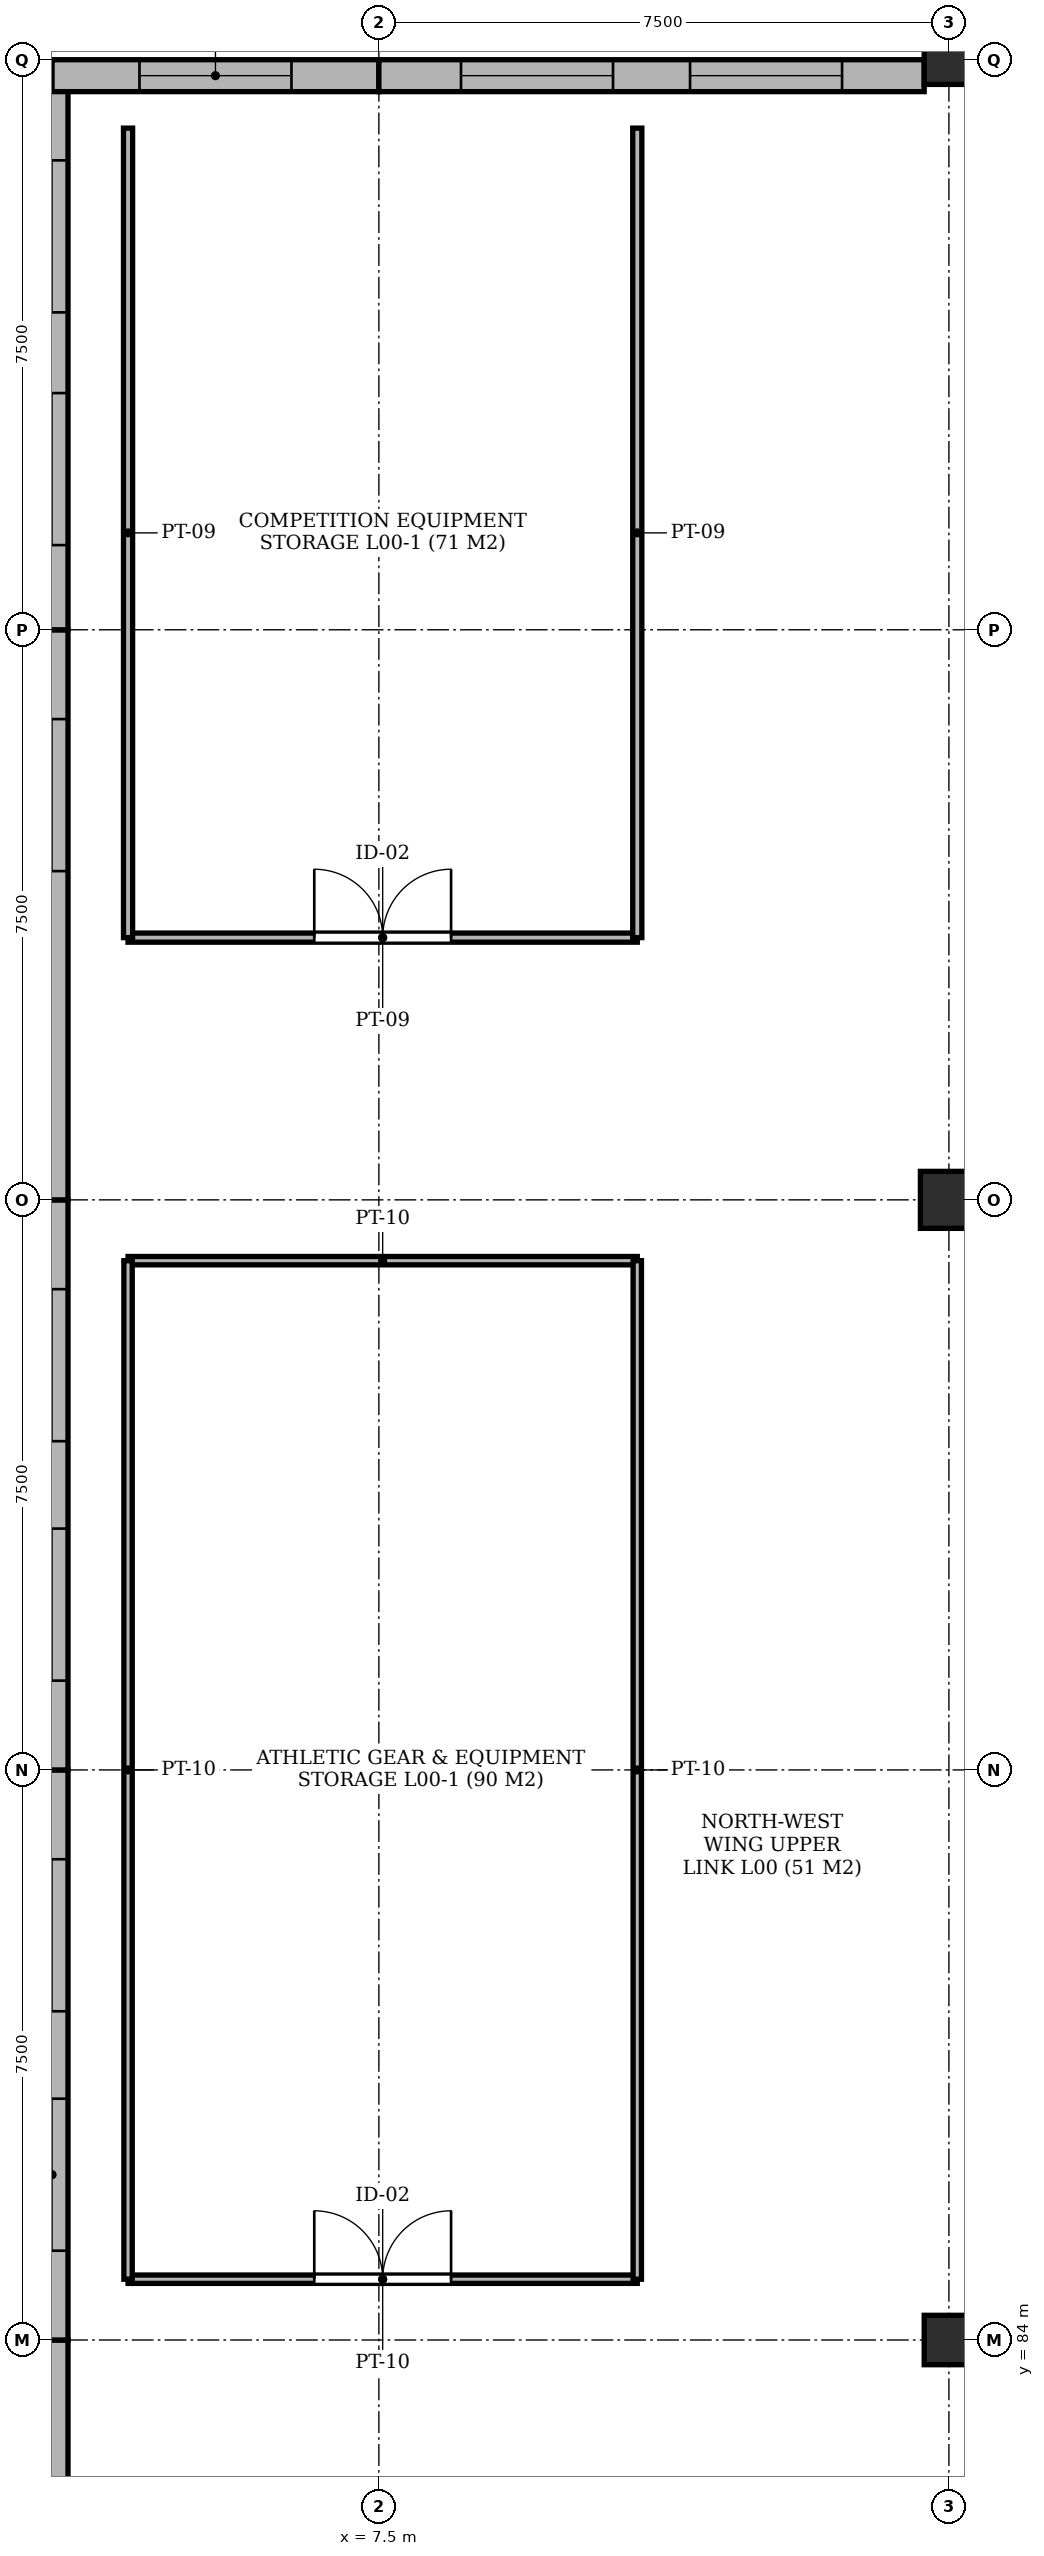
"""IFC4 building model, lengths in metres.
Left out: names, types, materials, properties, quantities, classifications, styles, units other than length and angle.
Written with IfcOpenShell. Run it as: python <this file> out.ifc"""

import sys

from ifc_helpers import new_model, si_unit, direction, frame, frame_2d, origin, origin_2d, place, context, subcontext, project, spatial, rectangle, extrude, element, fill, save


model = new_model("IFC4")
c1 = context("Model", 3, precision=1e-05, world=origin(), true_north=direction((0.0, 1.0)))
c2 = subcontext(c1, "Body", "Model", "MODEL_VIEW")
j1 = project(units=[si_unit("LENGTHUNIT", "METRE"), si_unit("PLANEANGLEUNIT", "RADIAN")], contexts=[c1])
p1 = place(None, origin())
s1 = spatial("IfcSite", under=j1, at=p1, CompositionType="ELEMENT")
p2 = place(p1, origin())
s2 = spatial("IfcBuilding", under=s1, at=p2, CompositionType="ELEMENT")
p3 = place(p2, origin())
s3 = spatial("IfcBuildingStorey", under=s2, at=p3, CompositionType="ELEMENT", Elevation=0.0)
p4 = place(p3, frame((15.0, 84.0, -0.35), z_axis=(0.0, 0.0, 1.0), x_axis=(1.0, 0.0, 0.0)))
e1 = element("IfcColumn", 1, at=p4, inside=s3, PredefinedType="COLUMN", context=c2, shape_type="SweptSolid", body=[
    extrude(rectangle(XDim=0.65, YDim=0.65, at=origin_2d()), origin(), (0.0, 0.0, 1.0), 4.65),
])
p5 = place(p3, frame((15.0, 99.0, -0.35), z_axis=(0.0, 0.0, 1.0), x_axis=(1.0, 0.0, 0.0)))
e2 = element("IfcColumn", 2, at=p5, inside=s3, PredefinedType="COLUMN", context=c2, shape_type="SweptSolid", body=[
    extrude(rectangle(XDim=0.75, YDim=0.75, at=origin_2d()), origin(), (0.0, 0.0, 1.0), 4.65),
])
p6 = place(p3, frame((15.0, 114.0, -0.35), z_axis=(0.0, 0.0, 1.0), x_axis=(1.0, 0.0, 0.0)))
e3 = element("IfcColumn", 3, at=p6, inside=s3, PredefinedType="COLUMN", context=c2, shape_type="SweptSolid", body=[
    extrude(rectangle(XDim=0.65, YDim=0.65, at=origin_2d()), origin(), (0.0, 0.0, 1.0), 4.65),
])
p7 = place(p3, frame((3.2, 84.0, 0.0), z_axis=(0.0, 0.0, 1.0), x_axis=(0.0, -1.0, 0.0)))
e4 = element("IfcWall", 4, at=p7, inside=s3, PredefinedType="SOLIDWALL", context=c2, shape_type="SweptSolid", body=[
    extrude(rectangle(XDim=7.2, YDim=0.42, at=frame_2d((3.6, 0.0))), origin(), (0.0, 0.0, 1.0), 3.82),
])
p8 = place(p7, frame((2.4, 0.0, 0.0)))
e5 = element("IfcOpeningElement", 5, at=p8, cuts=e4, PredefinedType="OPENING", context=c2, shape_type="SweptSolid", body=[
    extrude(rectangle(XDim=2.4, YDim=2.85, at=frame_2d((1.2, 1.425))), frame((0.0, 0.222, 0.0), z_axis=(0.0, -1.0, 0.0), x_axis=(1.0, 0.0, 0.0)), (0.0, 0.0, 1.0), 0.444),
])
p9 = place(p3, frame((3.2, 91.5, 0.0), z_axis=(0.0, 0.0, 1.0), x_axis=(0.0, -1.0, 0.0)))
e6 = element("IfcWall", 6, at=p9, inside=s3, PredefinedType="SOLIDWALL", context=c2, shape_type="SweptSolid", body=[
    extrude(rectangle(XDim=7.5, YDim=0.42, at=frame_2d((3.75, 0.0))), origin(), (0.0, 0.0, 1.0), 3.82),
])
p10 = place(p9, frame((4.325, 0.0, 0.92)))
e7 = element("IfcOpeningElement", 7, at=p10, cuts=e6, PredefinedType="OPENING", context=c2, shape_type="SweptSolid", body=[
    extrude(rectangle(XDim=2.0, YDim=1.89, at=frame_2d((1.0, 0.945))), frame((0.0, 0.222, 0.0), z_axis=(0.0, -1.0, 0.0), x_axis=(1.0, 0.0, 0.0)), (0.0, 0.0, 1.0), 0.444),
])
p11 = place(p9, frame((1.175, 0.0, 0.92)))
e8 = element("IfcOpeningElement", 8, at=p11, cuts=e6, PredefinedType="OPENING", context=c2, shape_type="SweptSolid", body=[
    extrude(rectangle(XDim=2.0, YDim=1.89, at=frame_2d((1.0, 0.945))), frame((0.0, 0.222, 0.0), z_axis=(0.0, -1.0, 0.0), x_axis=(1.0, 0.0, 0.0)), (0.0, 0.0, 1.0), 0.444),
])
p12 = place(p3, frame((3.2, 99.0, 0.0), z_axis=(0.0, 0.0, 1.0), x_axis=(0.0, -1.0, 0.0)))
e9 = element("IfcWall", 9, at=p12, inside=s3, PredefinedType="SOLIDWALL", context=c2, shape_type="SweptSolid", body=[
    extrude(rectangle(XDim=7.5, YDim=0.42, at=frame_2d((3.75, 0.0))), origin(), (0.0, 0.0, 1.0), 3.82),
])
p13 = place(p12, frame((4.325, 0.0, 0.92)))
e10 = element("IfcOpeningElement", 10, at=p13, cuts=e9, PredefinedType="OPENING", context=c2, shape_type="SweptSolid", body=[
    extrude(rectangle(XDim=2.0, YDim=1.89, at=frame_2d((1.0, 0.945))), frame((0.0, 0.222, 0.0), z_axis=(0.0, -1.0, 0.0), x_axis=(1.0, 0.0, 0.0)), (0.0, 0.0, 1.0), 0.444),
])
p14 = place(p12, frame((1.175, 0.0, 0.92)))
e11 = element("IfcOpeningElement", 11, at=p14, cuts=e9, PredefinedType="OPENING", context=c2, shape_type="SweptSolid", body=[
    extrude(rectangle(XDim=2.0, YDim=1.89, at=frame_2d((1.0, 0.945))), frame((0.0, 0.222, 0.0), z_axis=(0.0, -1.0, 0.0), x_axis=(1.0, 0.0, 0.0)), (0.0, 0.0, 1.0), 0.444),
])
p15 = place(p3, frame((3.2, 106.5, 0.0), z_axis=(0.0, 0.0, 1.0), x_axis=(0.0, -1.0, 0.0)))
e12 = element("IfcWall", 12, at=p15, inside=s3, PredefinedType="SOLIDWALL", context=c2, shape_type="SweptSolid", body=[
    extrude(rectangle(XDim=7.5, YDim=0.42, at=frame_2d((3.75, 0.0))), origin(), (0.0, 0.0, 1.0), 3.82),
])
p16 = place(p15, frame((1.175, 0.0, 0.92)))
e13 = element("IfcOpeningElement", 13, at=p16, cuts=e12, PredefinedType="OPENING", context=c2, shape_type="SweptSolid", body=[
    extrude(rectangle(XDim=2.0, YDim=1.89, at=frame_2d((1.0, 0.945))), frame((0.0, 0.222, 0.0), z_axis=(0.0, -1.0, 0.0), x_axis=(1.0, 0.0, 0.0)), (0.0, 0.0, 1.0), 0.444),
])
p17 = place(p3, frame((3.2, 113.79, 0.0), z_axis=(0.0, 0.0, 1.0), x_axis=(0.0, -1.0, 0.0)))
e14 = element("IfcWall", 14, at=p17, inside=s3, PredefinedType="SOLIDWALL", context=c2, shape_type="SweptSolid", body=[
    extrude(rectangle(XDim=7.29, YDim=0.42, at=frame_2d((3.645, 0.0))), origin(), (0.0, 0.0, 1.0), 3.82),
])
p18 = place(p17, frame((4.176, 0.0, 0.92)))
e15 = element("IfcOpeningElement", 15, at=p18, cuts=e14, PredefinedType="OPENING", context=c2, shape_type="SweptSolid", body=[
    extrude(rectangle(XDim=2.0, YDim=1.89, at=frame_2d((1.0, 0.945))), frame((0.0, 0.222, 0.0), z_axis=(0.0, -1.0, 0.0), x_axis=(1.0, 0.0, 0.0)), (0.0, 0.0, 1.0), 0.444),
])
p19 = place(p17, frame((1.114, 0.0, 0.92)))
e16 = element("IfcOpeningElement", 16, at=p19, cuts=e14, PredefinedType="OPENING", context=c2, shape_type="SweptSolid", body=[
    extrude(rectangle(XDim=2.0, YDim=1.89, at=frame_2d((1.0, 0.945))), frame((0.0, 0.222, 0.0), z_axis=(0.0, -1.0, 0.0), x_axis=(1.0, 0.0, 0.0)), (0.0, 0.0, 1.0), 0.444),
])
p20 = place(p3, frame((7.5, 113.79, 0.0), z_axis=(0.0, 0.0, 1.0), x_axis=(-1.0, 0.0, 0.0)))
e17 = element("IfcWall", 17, at=p20, inside=s3, PredefinedType="SOLIDWALL", context=c2, shape_type="SweptSolid", body=[
    extrude(rectangle(XDim=4.3, YDim=0.42, at=frame_2d((2.15, 0.0))), origin(), (0.0, 0.0, 1.0), 3.45),
])
p21 = place(p20, frame((1.15, 0.0, 0.92)))
e18 = element("IfcOpeningElement", 18, at=p21, cuts=e17, PredefinedType="OPENING", context=c2, shape_type="SweptSolid", body=[
    extrude(rectangle(XDim=2.0, YDim=1.89, at=frame_2d((1.0, 0.945))), frame((0.0, 0.222, 0.0), z_axis=(0.0, -1.0, 0.0), x_axis=(1.0, 0.0, 0.0)), (0.0, 0.0, 1.0), 0.444),
])
p22 = place(p3, frame((14.675, 113.79, 0.0), z_axis=(0.0, 0.0, 1.0), x_axis=(-1.0, 0.0, 0.0)))
e19 = element("IfcWall", 19, at=p22, inside=s3, PredefinedType="SOLIDWALL", context=c2, shape_type="SweptSolid", body=[
    extrude(rectangle(XDim=7.175, YDim=0.42, at=frame_2d((3.587, 0.0))), origin(), (0.0, 0.0, 1.0), 3.45),
])
p23 = place(p22, frame((4.094, 0.0, 0.92)))
e20 = element("IfcOpeningElement", 20, at=p23, cuts=e19, PredefinedType="OPENING", context=c2, shape_type="SweptSolid", body=[
    extrude(rectangle(XDim=2.0, YDim=1.89, at=frame_2d((1.0, 0.945))), frame((0.0, 0.222, 0.0), z_axis=(0.0, -1.0, 0.0), x_axis=(1.0, 0.0, 0.0)), (0.0, 0.0, 1.0), 0.444),
])
p24 = place(p22, frame((1.081, 0.0, 0.92)))
e21 = element("IfcOpeningElement", 21, at=p24, cuts=e19, PredefinedType="OPENING", context=c2, shape_type="SweptSolid", body=[
    extrude(rectangle(XDim=2.0, YDim=1.89, at=frame_2d((1.0, 0.945))), frame((0.0, 0.222, 0.0), z_axis=(0.0, -1.0, 0.0), x_axis=(1.0, 0.0, 0.0)), (0.0, 0.0, 1.0), 0.444),
])
p25 = place(p3, frame((4.2, 84.8, 0.0), z_axis=(0.0, 0.0, 1.0), x_axis=(1.0, 0.0, 0.0)))
e22 = element("IfcWall", 22, at=p25, inside=s3, PredefinedType="PARTITIONING", context=c2, shape_type="SweptSolid", body=[
    extrude(rectangle(XDim=6.7, YDim=0.11, at=frame_2d((3.35, 0.0))), origin(), (0.0, 0.0, 1.0), 3.88),
])
p26 = place(p25, frame((2.45, 0.0, 0.0)))
e23 = element("IfcOpeningElement", 23, at=p26, cuts=e22, PredefinedType="OPENING", context=c2, shape_type="SweptSolid", body=[
    extrude(rectangle(XDim=1.8, YDim=2.25, at=frame_2d((0.9, 1.125))), frame((0.0, 0.067, 0.0), z_axis=(0.0, -1.0, 0.0), x_axis=(1.0, 0.0, 0.0)), (0.0, 0.0, 1.0), 0.134),
])
p27 = place(p3, frame((4.2, 98.2, 0.0), z_axis=(0.0, 0.0, 1.0), x_axis=(1.0, 0.0, 0.0)))
e24 = element("IfcWall", 24, at=p27, inside=s3, PredefinedType="PARTITIONING", context=c2, shape_type="SweptSolid", body=[
    extrude(rectangle(XDim=6.7, YDim=0.11, at=frame_2d((3.35, 0.0))), origin(), (0.0, 0.0, 1.0), 3.88),
])
for number, where, z_axis, x_axis in (
    (25, (4.2, 84.8, 0.0), (0.0, 0.0, 1.0), (0.0, 1.0, 0.0)),
    (26, (10.9, 84.8, 0.0), (0.0, 0.0, 1.0), (0.0, 1.0, 0.0)),
):
    element("IfcWall", number, at=place(p3, frame(where, z_axis=z_axis, x_axis=x_axis)), inside=s3, PredefinedType="PARTITIONING", context=c2, shape_type="SweptSolid", body=[
        extrude(rectangle(XDim=13.4, YDim=0.11, at=frame_2d((6.7, 0.0))), origin(), (0.0, 0.0, 1.0), 3.88),
    ])
p28 = place(p3, frame((4.2, 102.45, 0.0), z_axis=(0.0, 0.0, 1.0), x_axis=(1.0, 0.0, 0.0)))
e27 = element("IfcWall", 27, at=p28, inside=s3, PredefinedType="PARTITIONING", context=c2, shape_type="SweptSolid", body=[
    extrude(rectangle(XDim=6.7, YDim=0.12, at=frame_2d((3.35, 0.0))), origin(), (0.0, 0.0, 1.0), 3.88),
])
p29 = place(p28, frame((2.45, 0.0, 0.0)))
e28 = element("IfcOpeningElement", 28, at=p29, cuts=e27, PredefinedType="OPENING", context=c2, shape_type="SweptSolid", body=[
    extrude(rectangle(XDim=1.8, YDim=2.25, at=frame_2d((0.9, 1.125))), frame((0.0, 0.072, 0.0), z_axis=(0.0, -1.0, 0.0), x_axis=(1.0, 0.0, 0.0)), (0.0, 0.0, 1.0), 0.144),
])
for number, where, z_axis, x_axis in (
    (29, (4.2, 102.45, 0.0), (0.0, 0.0, 1.0), (0.0, 1.0, 0.0)),
    (30, (10.9, 102.45, 0.0), (0.0, 0.0, 1.0), (0.0, 1.0, 0.0)),
):
    element("IfcWall", number, at=place(p3, frame(where, z_axis=z_axis, x_axis=x_axis)), inside=s3, PredefinedType="PARTITIONING", context=c2, shape_type="SweptSolid", body=[
        extrude(rectangle(XDim=10.65, YDim=0.12, at=frame_2d((5.325, 0.0))), origin(), (0.0, 0.0, 1.0), 3.88),
    ])
p30 = place(p10, origin())
e31 = element("IfcWindow", 31, at=p30, inside=s3, PartitioningType="SINGLE_PANEL", PredefinedType="WINDOW", context=c2, shape_type="SweptSolid", body=[
    extrude(rectangle(XDim=2.0, YDim=1.89, at=frame_2d((1.0, 0.945))), frame((0.0, 0.03, 0.0), z_axis=(0.0, -1.0, 0.0), x_axis=(1.0, 0.0, 0.0)), (0.0, 0.0, 1.0), 0.06),
])
fill(e7, e31)
p31 = place(p11, origin())
e32 = element("IfcWindow", 32, at=p31, inside=s3, PartitioningType="SINGLE_PANEL", PredefinedType="WINDOW", context=c2, shape_type="SweptSolid", body=[
    extrude(rectangle(XDim=2.0, YDim=1.89, at=frame_2d((1.0, 0.945))), frame((0.0, 0.03, 0.0), z_axis=(0.0, -1.0, 0.0), x_axis=(1.0, 0.0, 0.0)), (0.0, 0.0, 1.0), 0.06),
])
fill(e8, e32)
p32 = place(p13, origin())
e33 = element("IfcWindow", 33, at=p32, inside=s3, PartitioningType="SINGLE_PANEL", PredefinedType="WINDOW", context=c2, shape_type="SweptSolid", body=[
    extrude(rectangle(XDim=2.0, YDim=1.89, at=frame_2d((1.0, 0.945))), frame((0.0, 0.03, 0.0), z_axis=(0.0, -1.0, 0.0), x_axis=(1.0, 0.0, 0.0)), (0.0, 0.0, 1.0), 0.06),
])
fill(e10, e33)
p33 = place(p14, origin())
e34 = element("IfcWindow", 34, at=p33, inside=s3, PartitioningType="SINGLE_PANEL", PredefinedType="WINDOW", context=c2, shape_type="SweptSolid", body=[
    extrude(rectangle(XDim=2.0, YDim=1.89, at=frame_2d((1.0, 0.945))), frame((0.0, 0.03, 0.0), z_axis=(0.0, -1.0, 0.0), x_axis=(1.0, 0.0, 0.0)), (0.0, 0.0, 1.0), 0.06),
])
fill(e11, e34)
p34 = place(p16, origin())
e35 = element("IfcWindow", 35, at=p34, inside=s3, PartitioningType="SINGLE_PANEL", PredefinedType="WINDOW", context=c2, shape_type="SweptSolid", body=[
    extrude(rectangle(XDim=2.0, YDim=1.89, at=frame_2d((1.0, 0.945))), frame((0.0, 0.03, 0.0), z_axis=(0.0, -1.0, 0.0), x_axis=(1.0, 0.0, 0.0)), (0.0, 0.0, 1.0), 0.06),
])
fill(e13, e35)
p35 = place(p18, origin())
e36 = element("IfcWindow", 36, at=p35, inside=s3, PartitioningType="SINGLE_PANEL", PredefinedType="WINDOW", context=c2, shape_type="SweptSolid", body=[
    extrude(rectangle(XDim=2.0, YDim=1.89, at=frame_2d((1.0, 0.945))), frame((0.0, 0.03, 0.0), z_axis=(0.0, -1.0, 0.0), x_axis=(1.0, 0.0, 0.0)), (0.0, 0.0, 1.0), 0.06),
])
fill(e15, e36)
p36 = place(p19, origin())
e37 = element("IfcWindow", 37, at=p36, inside=s3, PartitioningType="SINGLE_PANEL", PredefinedType="WINDOW", context=c2, shape_type="SweptSolid", body=[
    extrude(rectangle(XDim=2.0, YDim=1.89, at=frame_2d((1.0, 0.945))), frame((0.0, 0.03, 0.0), z_axis=(0.0, -1.0, 0.0), x_axis=(1.0, 0.0, 0.0)), (0.0, 0.0, 1.0), 0.06),
])
fill(e16, e37)
p37 = place(p21, origin())
e38 = element("IfcWindow", 38, at=p37, inside=s3, PartitioningType="SINGLE_PANEL", PredefinedType="WINDOW", context=c2, shape_type="SweptSolid", body=[
    extrude(rectangle(XDim=2.0, YDim=1.89, at=frame_2d((1.0, 0.945))), frame((0.0, 0.03, 0.0), z_axis=(0.0, -1.0, 0.0), x_axis=(1.0, 0.0, 0.0)), (0.0, 0.0, 1.0), 0.06),
])
fill(e18, e38)
p38 = place(p23, origin())
e39 = element("IfcWindow", 39, at=p38, inside=s3, PartitioningType="SINGLE_PANEL", PredefinedType="WINDOW", context=c2, shape_type="SweptSolid", body=[
    extrude(rectangle(XDim=2.0, YDim=1.89, at=frame_2d((1.0, 0.945))), frame((0.0, 0.03, 0.0), z_axis=(0.0, -1.0, 0.0), x_axis=(1.0, 0.0, 0.0)), (0.0, 0.0, 1.0), 0.06),
])
fill(e20, e39)
p39 = place(p24, origin())
e40 = element("IfcWindow", 40, at=p39, inside=s3, PartitioningType="SINGLE_PANEL", PredefinedType="WINDOW", context=c2, shape_type="SweptSolid", body=[
    extrude(rectangle(XDim=2.0, YDim=1.89, at=frame_2d((1.0, 0.945))), frame((0.0, 0.03, 0.0), z_axis=(0.0, -1.0, 0.0), x_axis=(1.0, 0.0, 0.0)), (0.0, 0.0, 1.0), 0.06),
])
fill(e21, e40)
p40 = place(p26, origin())
e41 = element("IfcDoor", 41, at=p40, inside=s3, OperationType="DOUBLE_DOOR_SINGLE_SWING", PredefinedType="DOOR", context=c2, shape_type="SweptSolid", body=[
    extrude(rectangle(XDim=1.8, YDim=2.25, at=frame_2d((0.9, 1.125))), frame((0.0, 0.025, 0.0), z_axis=(0.0, -1.0, 0.0), x_axis=(1.0, 0.0, 0.0)), (0.0, 0.0, 1.0), 0.05),
])
fill(e23, e41)
p41 = place(p29, origin())
e42 = element("IfcDoor", 42, at=p41, inside=s3, OperationType="DOUBLE_DOOR_SINGLE_SWING", PredefinedType="DOOR", context=c2, shape_type="SweptSolid", body=[
    extrude(rectangle(XDim=1.8, YDim=2.25, at=frame_2d((0.9, 1.125))), frame((0.0, 0.025, 0.0), z_axis=(0.0, -1.0, 0.0), x_axis=(1.0, 0.0, 0.0)), (0.0, 0.0, 1.0), 0.05),
])
fill(e28, e42)
save(model, sys.argv[1])
